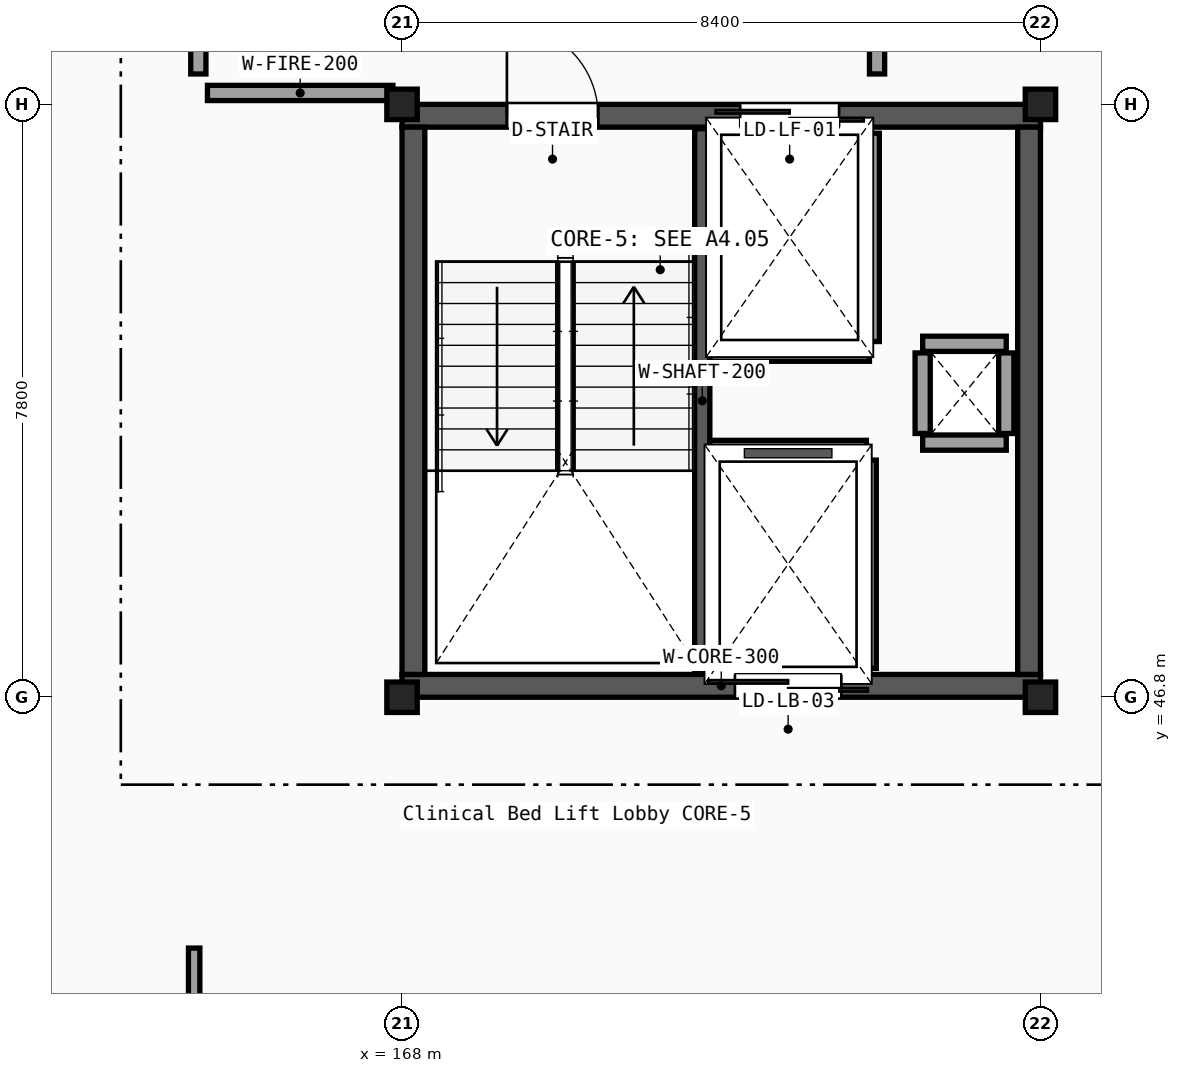
"""IFC4 building model, lengths in metres.
Left out: names, types, materials, properties, quantities, classifications, styles, units other than length and angle.
Written with IfcOpenShell. Run it as: python <this file> out.ifc"""

import sys

from ifc_helpers import new_model, si_unit, direction, frame, frame_2d, origin, origin_2d, place, context, subcontext, project, spatial, rectangle, i_section, extrude, element, fill, save


model = new_model("IFC4")
c1 = context("Model", 3, precision=1e-05, world=origin(), true_north=direction((0.0, 1.0)))
c2 = subcontext(c1, "Body", "Model", "MODEL_VIEW")
j1 = project(units=[si_unit("LENGTHUNIT", "METRE"), si_unit("PLANEANGLEUNIT", "RADIAN")], contexts=[c1])
p1 = place(None, origin())
s1 = spatial("IfcSite", under=j1, at=p1, CompositionType="ELEMENT")
p2 = place(p1, origin())
s2 = spatial("IfcBuilding", under=s1, at=p2, CompositionType="ELEMENT")
p3 = place(p2, frame((0.0, 0.0, 31.05)))
s3 = spatial("IfcBuildingStorey", under=s2, at=p3, CompositionType="ELEMENT", Elevation=31.05)
for number, where, z_axis, x_axis in (
    (1, (168.0, 46.8, 0.0), (0.0, 0.0, 1.0), (1.0, 0.0, 0.0)),
    (2, (168.0, 54.6, 0.0), (0.0, 0.0, 1.0), (1.0, 0.0, 0.0)),
    (3, (176.4, 46.8, 0.0), (0.0, 0.0, 1.0), (1.0, 0.0, 0.0)),
    (4, (176.4, 54.6, 0.0), (0.0, 0.0, 1.0), (1.0, 0.0, 0.0)),
):
    element("IfcColumn", number, at=place(p3, frame(where, z_axis=z_axis, x_axis=x_axis)), inside=s3, PredefinedType="COLUMN", context=c2, shape_type="SweptSolid", body=[
        extrude(i_section(OverallWidth=0.3, OverallDepth=0.4, WebThickness=0.013, FlangeThickness=0.024, FilletRadius=0.027, at=origin_2d()), origin(), (0.0, 0.0, 1.0), 4.05),
    ])
p4 = place(p3, frame((168.0, 46.95, 0.0), z_axis=(0.0, 0.0, 1.0), x_axis=(1.0, 0.0, 0.0)))
e5 = element("IfcWall", 5, at=p4, inside=s3, PredefinedType="SHEAR", context=c2, shape_type="SweptSolid", body=[
    extrude(rectangle(XDim=8.4, YDim=0.3, at=frame_2d((4.2, 0.0))), origin(), (0.0, 0.0, 1.0), 3.81),
])
p5 = place(p4, frame((4.38, 0.0, 0.0)))
e6 = element("IfcOpeningElement", 6, at=p5, cuts=e5, PredefinedType="OPENING", context=c2, shape_type="SweptSolid", body=[
    extrude(rectangle(XDim=1.4, YDim=2.2, at=frame_2d((0.7, 1.1))), frame((0.0, 0.16, 0.0), z_axis=(0.0, -1.0, 0.0), x_axis=(1.0, 0.0, 0.0)), (0.0, 0.0, 1.0), 0.32),
])
p6 = place(p3, frame((168.0, 54.45, 0.0), z_axis=(0.0, 0.0, 1.0), x_axis=(1.0, 0.0, 0.0)))
e7 = element("IfcWall", 7, at=p6, inside=s3, PredefinedType="SHEAR", context=c2, shape_type="SweptSolid", body=[
    extrude(rectangle(XDim=8.4, YDim=0.3, at=frame_2d((4.2, 0.0))), origin(), (0.0, 0.0, 1.0), 3.81),
])
p7 = place(p6, frame((1.38, 0.0, 0.0)))
e8 = element("IfcOpeningElement", 8, at=p7, cuts=e7, PredefinedType="OPENING", context=c2, shape_type="SweptSolid", body=[
    extrude(rectangle(XDim=1.2, YDim=2.15, at=frame_2d((0.6, 1.075))), frame((0.0, 0.16, 0.0), z_axis=(0.0, -1.0, 0.0), x_axis=(1.0, 0.0, 0.0)), (0.0, 0.0, 1.0), 0.32),
])
p8 = place(p6, frame((4.45, 0.0, 0.0)))
e9 = element("IfcOpeningElement", 9, at=p8, cuts=e7, PredefinedType="OPENING", context=c2, shape_type="SweptSolid", body=[
    extrude(rectangle(XDim=1.3, YDim=2.2, at=frame_2d((0.65, 1.1))), frame((0.0, 0.16, 0.0), z_axis=(0.0, -1.0, 0.0), x_axis=(1.0, 0.0, 0.0)), (0.0, 0.0, 1.0), 0.32),
])
for number, where, z_axis, x_axis in (
    (10, (168.15, 47.1, 0.0), (0.0, 0.0, 1.0), (0.0, 1.0, 0.0)),
    (11, (176.25, 47.1, 0.0), (0.0, 0.0, 1.0), (0.0, 1.0, 0.0)),
):
    element("IfcWall", number, at=place(p3, frame(where, z_axis=z_axis, x_axis=x_axis)), inside=s3, PredefinedType="SHEAR", context=c2, shape_type="SweptSolid", body=[
        extrude(rectangle(XDim=7.2, YDim=0.3, at=frame_2d((3.6, 0.0))), origin(), (0.0, 0.0, 1.0), 3.81),
    ])
p9 = place(p3, frame((171.95, 47.12, 0.0), z_axis=(0.0, 0.0, 1.0), x_axis=(0.0, 1.0, 0.0)))
e12 = element("IfcWall", 12, at=p9, inside=s3, PredefinedType="SHEAR", context=c2, shape_type="SweptSolid", body=[
    extrude(rectangle(XDim=7.16, YDim=0.2, at=frame_2d((3.58, 0.0))), origin(), (0.0, 0.0, 1.0), 3.81),
])
for number, where, z_axis, x_axis in (
    (13, (174.85, 50.15, 0.0), (0.0, 0.0, 1.0), (1.0, 0.0, 0.0)),
    (14, (174.85, 51.45, 0.0), (0.0, 0.0, 1.0), (1.0, 0.0, 0.0)),
):
    element("IfcWall", number, at=place(p3, frame(where, z_axis=z_axis, x_axis=x_axis)), inside=s3, PredefinedType="PARTITIONING", context=c2, shape_type="SweptSolid", body=[
        extrude(rectangle(XDim=1.1, YDim=0.2, at=frame_2d((0.55, 0.0))), origin(), (0.0, 0.0, 1.0), 3.34),
    ])
for number, where, z_axis, x_axis in (
    (15, (174.85, 50.27, 0.0), (0.0, 0.0, 1.0), (0.0, 1.0, 0.0)),
    (16, (175.95, 50.27, 0.0), (0.0, 0.0, 1.0), (0.0, 1.0, 0.0)),
):
    element("IfcWall", number, at=place(p3, frame(where, z_axis=z_axis, x_axis=x_axis)), inside=s3, PredefinedType="PARTITIONING", context=c2, shape_type="SweptSolid", body=[
        extrude(rectangle(XDim=1.06, YDim=0.2, at=frame_2d((0.53, 0.0))), origin(), (0.0, 0.0, 1.0), 3.34),
    ])
p10 = place(p3, frame((174.18, 51.48, 0.0), z_axis=(0.0, 0.0, 1.0), x_axis=(0.0, 1.0, 0.0)))
e17 = element("IfcWall", 17, at=p10, inside=s3, PredefinedType="PARTITIONING", context=c2, shape_type="SweptSolid", body=[
    extrude(rectangle(XDim=2.74, YDim=0.2, at=frame_2d((1.37, 0.0))), origin(), (0.0, 0.0, 1.0), 3.34),
])
p11 = place(p3, frame((172.05, 51.32, 0.0), z_axis=(0.0, 0.0, 1.0), x_axis=(1.0, 0.0, 0.0)))
e18 = element("IfcWall", 18, at=p11, inside=s3, PredefinedType="PARTITIONING", context=c2, shape_type="SweptSolid", body=[
    extrude(rectangle(XDim=2.1, YDim=0.2, at=frame_2d((1.05, 0.0))), origin(), (0.0, 0.0, 1.0), 3.34),
])
p12 = place(p3, frame((174.14, 47.18, 0.0), z_axis=(0.0, 0.0, 1.0), x_axis=(0.0, 1.0, 0.0)))
e19 = element("IfcWall", 19, at=p12, inside=s3, PredefinedType="PARTITIONING", context=c2, shape_type="SweptSolid", body=[
    extrude(rectangle(XDim=2.74, YDim=0.2, at=frame_2d((1.37, 0.0))), origin(), (0.0, 0.0, 1.0), 3.34),
])
p13 = place(p3, frame((172.05, 50.08, 0.0), z_axis=(0.0, 0.0, 1.0), x_axis=(1.0, 0.0, 0.0)))
e20 = element("IfcWall", 20, at=p13, inside=s3, PredefinedType="PARTITIONING", context=c2, shape_type="SweptSolid", body=[
    extrude(rectangle(XDim=2.06, YDim=0.2, at=frame_2d((1.03, 0.0))), origin(), (0.0, 0.0, 1.0), 3.34),
])
p14 = place(p3, frame((165.44, 54.75, 0.0), z_axis=(0.0, 0.0, 1.0), x_axis=(1.0, 0.0, 0.0)))
e21 = element("IfcWall", 21, at=p14, inside=s3, PredefinedType="PARTITIONING", context=c2, shape_type="SweptSolid", body=[
    extrude(rectangle(XDim=2.44, YDim=0.2, at=frame_2d((1.22, 0.0))), origin(), (0.0, 0.0, 1.0), 3.34),
])
p15 = place(p3, frame((165.32, 55.0, 0.0), z_axis=(0.0, 0.0, 1.0), x_axis=(0.0, 1.0, 0.0)))
e22 = element("IfcWall", 22, at=p15, inside=s3, PredefinedType="PARTITIONING", context=c2, shape_type="SweptSolid", body=[
    extrude(rectangle(XDim=2.65, YDim=0.2, at=frame_2d((1.325, 0.0))), origin(), (0.0, 0.0, 1.0), 3.34),
])
p16 = place(p15, frame((0.525, 0.0, 0.0)))
e23 = element("IfcOpeningElement", 23, at=p16, cuts=e22, PredefinedType="OPENING", context=c2, shape_type="SweptSolid", body=[
    extrude(rectangle(XDim=1.6, YDim=2.2, at=frame_2d((0.8, 1.1))), frame((0.0, 0.11, 0.0), z_axis=(0.0, -1.0, 0.0), x_axis=(1.0, 0.0, 0.0)), (0.0, 0.0, 1.0), 0.22),
])
p17 = place(p3, frame((174.25, 55.0, 0.0), z_axis=(0.0, 0.0, 1.0), x_axis=(0.0, 1.0, 0.0)))
e24 = element("IfcWall", 24, at=p17, inside=s3, PredefinedType="PARTITIONING", context=c2, shape_type="SweptSolid", body=[
    extrude(rectangle(XDim=2.65, YDim=0.2, at=frame_2d((1.325, 0.0))), origin(), (0.0, 0.0, 1.0), 3.34),
])
p18 = place(p17, frame((0.525, 0.0, 0.0)))
e25 = element("IfcOpeningElement", 25, at=p18, cuts=e24, PredefinedType="OPENING", context=c2, shape_type="SweptSolid", body=[
    extrude(rectangle(XDim=1.6, YDim=2.2, at=frame_2d((0.8, 1.1))), frame((0.0, 0.11, 0.0), z_axis=(0.0, -1.0, 0.0), x_axis=(1.0, 0.0, 0.0)), (0.0, 0.0, 1.0), 0.22),
])
p19 = place(p3, frame((165.265, 39.62, 0.0), z_axis=(0.0, 0.0, 1.0), x_axis=(0.0, 1.0, 0.0)))
e26 = element("IfcWall", 26, at=p19, inside=s3, PredefinedType="PARTITIONING", context=c2, shape_type="SweptSolid", body=[
    extrude(rectangle(XDim=3.88, YDim=0.15, at=frame_2d((1.94, 0.0))), origin(), (0.0, 0.0, 1.0), 3.77),
])
p20 = place(p19, frame((1.415, 0.0, 0.0)))
e27 = element("IfcOpeningElement", 27, at=p20, cuts=e26, PredefinedType="OPENING", context=c2, shape_type="SweptSolid", body=[
    extrude(rectangle(XDim=1.05, YDim=2.15, at=frame_2d((0.525, 1.075))), frame((0.0, 0.085, 0.0), z_axis=(0.0, -1.0, 0.0), x_axis=(1.0, 0.0, 0.0)), (0.0, 0.0, 1.0), 0.17),
])
p21 = place(p7, origin())
e28 = element("IfcDoor", 28, at=p21, inside=s3, OperationType="SINGLE_SWING_LEFT", PredefinedType="DOOR", context=c2, shape_type="SweptSolid", body=[
    extrude(rectangle(XDim=1.2, YDim=2.15, at=frame_2d((0.6, 1.075))), frame((0.0, 0.025, 0.0), z_axis=(0.0, -1.0, 0.0), x_axis=(1.0, 0.0, 0.0)), (0.0, 0.0, 1.0), 0.05),
])
fill(e8, e28)
p22 = place(p8, origin())
e29 = element("IfcDoor", 29, at=p22, inside=s3, OperationType="DOUBLE_DOOR_SLIDING", PredefinedType="DOOR", context=c2, shape_type="SweptSolid", body=[
    extrude(rectangle(XDim=1.3, YDim=2.2, at=frame_2d((0.65, 1.1))), frame((0.0, 0.025, 0.0), z_axis=(0.0, -1.0, 0.0), x_axis=(1.0, 0.0, 0.0)), (0.0, 0.0, 1.0), 0.05),
])
fill(e9, e29)
p23 = place(p5, origin())
e30 = element("IfcDoor", 30, at=p23, inside=s3, OperationType="DOUBLE_DOOR_SLIDING", PredefinedType="DOOR", context=c2, shape_type="SweptSolid", body=[
    extrude(rectangle(XDim=1.4, YDim=2.2, at=frame_2d((0.7, 1.1))), frame((0.0, 0.025, 0.0), z_axis=(0.0, -1.0, 0.0), x_axis=(1.0, 0.0, 0.0)), (0.0, 0.0, 1.0), 0.05),
])
fill(e6, e30)
save(model, sys.argv[1])
